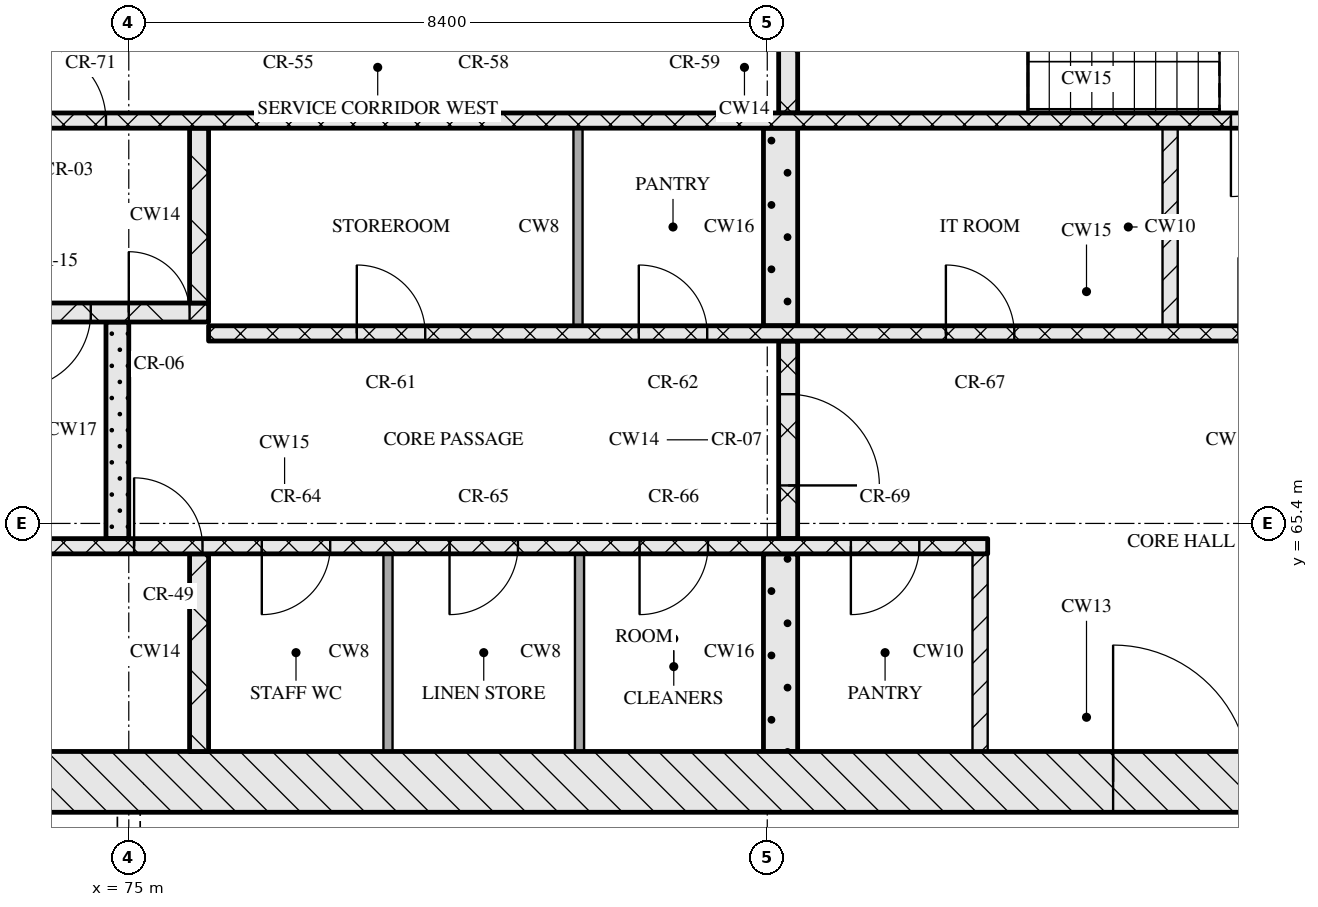
"""IFC4 building model, lengths in metres.
Left out: names, types, materials, properties, quantities, classifications, styles, units other than length and angle.
Written with IfcOpenShell. Run it as: python <this file> out.ifc"""

import sys

from ifc_helpers import new_model, si_unit, direction, frame, frame_2d, origin, place, context, subcontext, project, spatial, rectangle, extrude, element, fill, save


model = new_model("IFC4")
c1 = context("Model", 3, precision=1e-05, world=origin(), true_north=direction((0.0, 1.0)))
c2 = subcontext(c1, "Body", "Model", "MODEL_VIEW")
j1 = project(units=[si_unit("LENGTHUNIT", "METRE"), si_unit("PLANEANGLEUNIT", "RADIAN")], contexts=[c1])
p1 = place(None, origin())
s1 = spatial("IfcSite", under=j1, at=p1, CompositionType="ELEMENT")
p2 = place(p1, origin())
s2 = spatial("IfcBuilding", under=s1, at=p2, CompositionType="ELEMENT")
p3 = place(p2, frame((0.0, 0.0, 190.65)))
s3 = spatial("IfcBuildingStorey", under=s2, at=p3, CompositionType="ELEMENT", Elevation=190.65)
p4 = place(p3, frame((67.0, 62.0, 0.0), z_axis=(0.0, 0.0, 1.0), x_axis=(1.0, 0.0, 0.0)))
e1 = element("IfcWall", 1, at=p4, inside=s3, PredefinedType="SOLIDWALL", context=c2, shape_type="SweptSolid", body=[
    extrude(rectangle(XDim=41.2, YDim=0.8, at=frame_2d((20.6, 0.0))), origin(), (0.0, 0.0, 1.0), 3.3),
])
p5 = place(p4, frame((20.95, 0.0, 0.0)))
e2 = element("IfcOpeningElement", 2, at=p5, cuts=e1, PredefinedType="OPENING", context=c2, shape_type="SweptSolid", body=[
    extrude(rectangle(XDim=1.8, YDim=2.1, at=frame_2d((0.9, 1.05))), frame((0.0, 0.41, 0.0), z_axis=(0.0, -1.0, 0.0), x_axis=(1.0, 0.0, 0.0)), (0.0, 0.0, 1.0), 0.82),
])
p6 = place(p3, frame((75.925, 62.4, 0.0), z_axis=(0.0, 0.0, 1.0), x_axis=(0.0, 1.0, 0.0)))
e3 = element("IfcWall", 3, at=p6, inside=s3, PredefinedType="SOLIDWALL", context=c2, shape_type="SweptSolid", body=[
    extrude(rectangle(XDim=2.6, YDim=0.25, at=frame_2d((1.3, 0.0))), origin(), (0.0, 0.0, 1.0), 3.3),
])
for number, where, z_axis, x_axis in (
    (4, (78.41, 62.4, 0.0), (0.0, 0.0, 1.0), (0.0, 1.0, 0.0)),
    (5, (80.93, 62.4, 0.0), (0.0, 0.0, 1.0), (0.0, 1.0, 0.0)),
):
    element("IfcWall", number, at=place(p3, frame(where, z_axis=z_axis, x_axis=x_axis)), inside=s3, PredefinedType="PARTITIONING", context=c2, shape_type="SweptSolid", body=[
        extrude(rectangle(XDim=2.6, YDim=0.12, at=frame_2d((1.3, 0.0))), origin(), (0.0, 0.0, 1.0), 3.3),
    ])
p7 = place(p3, frame((83.575, 62.4, 0.0), z_axis=(0.0, 0.0, 1.0), x_axis=(0.0, 1.0, 0.0)))
e6 = element("IfcWall", 6, at=p7, inside=s3, PredefinedType="SOLIDWALL", context=c2, shape_type="SweptSolid", body=[
    extrude(rectangle(XDim=2.6, YDim=0.45, at=frame_2d((1.3, 0.0))), origin(), (0.0, 0.0, 1.0), 3.3),
])
p8 = place(p3, frame((86.2, 62.4, 0.0), z_axis=(0.0, 0.0, 1.0), x_axis=(0.0, 1.0, 0.0)))
e7 = element("IfcWall", 7, at=p8, inside=s3, PredefinedType="PARTITIONING", context=c2, shape_type="SweptSolid", body=[
    extrude(rectangle(XDim=2.6, YDim=0.2, at=frame_2d((1.3, 0.0))), origin(), (0.0, 0.0, 1.0), 3.3),
])
p9 = place(p3, frame((67.8, 65.1, 0.0), z_axis=(0.0, 0.0, 1.0), x_axis=(1.0, 0.0, 0.0)))
e8 = element("IfcWall", 8, at=p9, inside=s3, PredefinedType="SOLIDWALL", context=c2, shape_type="SweptSolid", body=[
    extrude(rectangle(XDim=18.5, YDim=0.2, at=frame_2d((9.25, 0.0))), origin(), (0.0, 0.0, 1.0), 3.3),
])
p10 = place(p9, frame((7.27, 0.0, 0.0)))
e9 = element("IfcOpeningElement", 9, at=p10, cuts=e8, PredefinedType="OPENING", context=c2, shape_type="SweptSolid", body=[
    extrude(rectangle(XDim=0.9, YDim=2.1, at=frame_2d((0.45, 1.05))), frame((0.0, 0.11, 0.0), z_axis=(0.0, -1.0, 0.0), x_axis=(1.0, 0.0, 0.0)), (0.0, 0.0, 1.0), 0.22),
])
p11 = place(p9, frame((8.95, 0.0, 0.0)))
e10 = element("IfcOpeningElement", 10, at=p11, cuts=e8, PredefinedType="OPENING", context=c2, shape_type="SweptSolid", body=[
    extrude(rectangle(XDim=0.9, YDim=2.1, at=frame_2d((0.45, 1.05))), frame((0.0, 0.11, 0.0), z_axis=(0.0, -1.0, 0.0), x_axis=(1.0, 0.0, 0.0)), (0.0, 0.0, 1.0), 0.22),
])
p12 = place(p9, frame((11.42, 0.0, 0.0)))
e11 = element("IfcOpeningElement", 11, at=p12, cuts=e8, PredefinedType="OPENING", context=c2, shape_type="SweptSolid", body=[
    extrude(rectangle(XDim=0.9, YDim=2.1, at=frame_2d((0.45, 1.05))), frame((0.0, 0.11, 0.0), z_axis=(0.0, -1.0, 0.0), x_axis=(1.0, 0.0, 0.0)), (0.0, 0.0, 1.0), 0.22),
])
p13 = place(p9, frame((13.92, 0.0, 0.0)))
e12 = element("IfcOpeningElement", 12, at=p13, cuts=e8, PredefinedType="OPENING", context=c2, shape_type="SweptSolid", body=[
    extrude(rectangle(XDim=0.9, YDim=2.1, at=frame_2d((0.45, 1.05))), frame((0.0, 0.11, 0.0), z_axis=(0.0, -1.0, 0.0), x_axis=(1.0, 0.0, 0.0)), (0.0, 0.0, 1.0), 0.22),
])
p14 = place(p9, frame((16.7, 0.0, 0.0)))
e13 = element("IfcOpeningElement", 13, at=p14, cuts=e8, PredefinedType="OPENING", context=c2, shape_type="SweptSolid", body=[
    extrude(rectangle(XDim=0.9, YDim=2.1, at=frame_2d((0.45, 1.05))), frame((0.0, 0.11, 0.0), z_axis=(0.0, -1.0, 0.0), x_axis=(1.0, 0.0, 0.0)), (0.0, 0.0, 1.0), 0.22),
])
p15 = place(p3, frame((74.85, 65.2, 0.0), z_axis=(0.0, 0.0, 1.0), x_axis=(0.0, 1.0, 0.0)))
e14 = element("IfcWall", 14, at=p15, inside=s3, PredefinedType="SOLIDWALL", context=c2, shape_type="SweptSolid", body=[
    extrude(rectangle(XDim=2.85, YDim=0.3, at=frame_2d((1.425, 0.0))), origin(), (0.0, 0.0, 1.0), 3.3),
])
p16 = place(p3, frame((83.675, 65.2, 0.0), z_axis=(0.0, 0.0, 1.0), x_axis=(0.0, 1.0, 0.0)))
e15 = element("IfcWall", 15, at=p16, inside=s3, PredefinedType="SOLIDWALL", context=c2, shape_type="SweptSolid", body=[
    extrude(rectangle(XDim=2.6, YDim=0.25, at=frame_2d((1.3, 0.0))), origin(), (0.0, 0.0, 1.0), 3.3),
])
p17 = place(p16, frame((0.7, 0.0, 0.0)))
e16 = element("IfcOpeningElement", 16, at=p17, cuts=e15, PredefinedType="OPENING", context=c2, shape_type="SweptSolid", body=[
    extrude(rectangle(XDim=1.2, YDim=2.1, at=frame_2d((0.6, 1.05))), frame((0.0, 0.135, 0.0), z_axis=(0.0, -1.0, 0.0), x_axis=(1.0, 0.0, 0.0)), (0.0, 0.0, 1.0), 0.27),
])
p18 = place(p3, frame((76.05, 67.9, 0.0), z_axis=(0.0, 0.0, 1.0), x_axis=(1.0, 0.0, 0.0)))
e17 = element("IfcWall", 17, at=p18, inside=s3, PredefinedType="SOLIDWALL", context=c2, shape_type="SweptSolid", body=[
    extrude(rectangle(XDim=23.1, YDim=0.2, at=frame_2d((11.55, 0.0))), origin(), (0.0, 0.0, 1.0), 3.3),
])
p19 = place(p18, frame((1.95, 0.0, 0.0)))
e18 = element("IfcOpeningElement", 18, at=p19, cuts=e17, PredefinedType="OPENING", context=c2, shape_type="SweptSolid", body=[
    extrude(rectangle(XDim=0.9, YDim=2.1, at=frame_2d((0.45, 1.05))), frame((0.0, 0.11, 0.0), z_axis=(0.0, -1.0, 0.0), x_axis=(1.0, 0.0, 0.0)), (0.0, 0.0, 1.0), 0.22),
])
p20 = place(p18, frame((5.66, 0.0, 0.0)))
e19 = element("IfcOpeningElement", 19, at=p20, cuts=e17, PredefinedType="OPENING", context=c2, shape_type="SweptSolid", body=[
    extrude(rectangle(XDim=0.9, YDim=2.1, at=frame_2d((0.45, 1.05))), frame((0.0, 0.11, 0.0), z_axis=(0.0, -1.0, 0.0), x_axis=(1.0, 0.0, 0.0)), (0.0, 0.0, 1.0), 0.22),
])
p21 = place(p18, frame((9.7, 0.0, 0.0)))
e20 = element("IfcOpeningElement", 20, at=p21, cuts=e17, PredefinedType="OPENING", context=c2, shape_type="SweptSolid", body=[
    extrude(rectangle(XDim=0.9, YDim=2.1, at=frame_2d((0.45, 1.05))), frame((0.0, 0.11, 0.0), z_axis=(0.0, -1.0, 0.0), x_axis=(1.0, 0.0, 0.0)), (0.0, 0.0, 1.0), 0.22),
])
p22 = place(p18, frame((13.55, 0.0, 0.0)))
e21 = element("IfcOpeningElement", 21, at=p22, cuts=e17, PredefinedType="OPENING", context=c2, shape_type="SweptSolid", body=[
    extrude(rectangle(XDim=1.0, YDim=2.1, at=frame_2d((0.5, 1.05))), frame((0.0, 0.11, 0.0), z_axis=(0.0, -1.0, 0.0), x_axis=(1.0, 0.0, 0.0)), (0.0, 0.0, 1.0), 0.22),
])
p23 = place(p18, frame((16.2, 0.0, 0.0)))
e22 = element("IfcOpeningElement", 22, at=p23, cuts=e17, PredefinedType="OPENING", context=c2, shape_type="SweptSolid", body=[
    extrude(rectangle(XDim=1.1, YDim=2.1, at=frame_2d((0.55, 1.05))), frame((0.0, 0.11, 0.0), z_axis=(0.0, -1.0, 0.0), x_axis=(1.0, 0.0, 0.0)), (0.0, 0.0, 1.0), 0.22),
])
p24 = place(p18, frame((18.7, 0.0, 0.0)))
e23 = element("IfcOpeningElement", 23, at=p24, cuts=e17, PredefinedType="OPENING", context=c2, shape_type="SweptSolid", body=[
    extrude(rectangle(XDim=1.1, YDim=2.1, at=frame_2d((0.55, 1.05))), frame((0.0, 0.11, 0.0), z_axis=(0.0, -1.0, 0.0), x_axis=(1.0, 0.0, 0.0)), (0.0, 0.0, 1.0), 0.22),
])
p25 = place(p18, frame((21.2, 0.0, 0.0)))
e24 = element("IfcOpeningElement", 24, at=p25, cuts=e17, PredefinedType="OPENING", context=c2, shape_type="SweptSolid", body=[
    extrude(rectangle(XDim=1.1, YDim=2.1, at=frame_2d((0.55, 1.05))), frame((0.0, 0.11, 0.0), z_axis=(0.0, -1.0, 0.0), x_axis=(1.0, 0.0, 0.0)), (0.0, 0.0, 1.0), 0.22),
])
p26 = place(p3, frame((80.91, 68.0, 0.0), z_axis=(0.0, 0.0, 1.0), x_axis=(0.0, 1.0, 0.0)))
e25 = element("IfcWall", 25, at=p26, inside=s3, PredefinedType="PARTITIONING", context=c2, shape_type="SweptSolid", body=[
    extrude(rectangle(XDim=2.6, YDim=0.12, at=frame_2d((1.3, 0.0))), origin(), (0.0, 0.0, 1.0), 3.3),
])
p27 = place(p3, frame((83.575, 68.0, 0.0), z_axis=(0.0, 0.0, 1.0), x_axis=(0.0, 1.0, 0.0)))
e26 = element("IfcWall", 26, at=p27, inside=s3, PredefinedType="SOLIDWALL", context=c2, shape_type="SweptSolid", body=[
    extrude(rectangle(XDim=2.6, YDim=0.45, at=frame_2d((1.3, 0.0))), origin(), (0.0, 0.0, 1.0), 3.3),
])
p28 = place(p3, frame((88.7, 68.0, 0.0), z_axis=(0.0, 0.0, 1.0), x_axis=(0.0, 1.0, 0.0)))
e27 = element("IfcWall", 27, at=p28, inside=s3, PredefinedType="PARTITIONING", context=c2, shape_type="SweptSolid", body=[
    extrude(rectangle(XDim=2.6, YDim=0.2, at=frame_2d((1.3, 0.0))), origin(), (0.0, 0.0, 1.0), 3.3),
])
p29 = place(p3, frame((67.8, 68.175, 0.0), z_axis=(0.0, 0.0, 1.0), x_axis=(1.0, 0.0, 0.0)))
e28 = element("IfcWall", 28, at=p29, inside=s3, PredefinedType="SOLIDWALL", context=c2, shape_type="SweptSolid", body=[
    extrude(rectangle(XDim=8.25, YDim=0.25, at=frame_2d((4.125, 0.0))), origin(), (0.0, 0.0, 1.0), 3.3),
])
p30 = place(p29, frame((5.7, 0.0, 0.0)))
e29 = element("IfcOpeningElement", 29, at=p30, cuts=e28, PredefinedType="OPENING", context=c2, shape_type="SweptSolid", body=[
    extrude(rectangle(XDim=1.0, YDim=2.1, at=frame_2d((0.5, 1.05))), frame((0.0, 0.135, 0.0), z_axis=(0.0, -1.0, 0.0), x_axis=(1.0, 0.0, 0.0)), (0.0, 0.0, 1.0), 0.27),
])
p31 = place(p29, frame((7.2, 0.0, 0.0)))
e30 = element("IfcOpeningElement", 30, at=p31, cuts=e28, PredefinedType="OPENING", context=c2, shape_type="SweptSolid", body=[
    extrude(rectangle(XDim=0.8, YDim=2.1, at=frame_2d((0.4, 1.05))), frame((0.0, 0.135, 0.0), z_axis=(0.0, -1.0, 0.0), x_axis=(1.0, 0.0, 0.0)), (0.0, 0.0, 1.0), 0.27),
])
p32 = place(p3, frame((75.925, 68.3, 0.0), z_axis=(0.0, 0.0, 1.0), x_axis=(0.0, 1.0, 0.0)))
e31 = element("IfcWall", 31, at=p32, inside=s3, PredefinedType="SOLIDWALL", context=c2, shape_type="SweptSolid", body=[
    extrude(rectangle(XDim=2.3, YDim=0.25, at=frame_2d((1.15, 0.0))), origin(), (0.0, 0.0, 1.0), 3.3),
])
p33 = place(p3, frame((67.8, 70.7, 0.0), z_axis=(0.0, 0.0, 1.0), x_axis=(1.0, 0.0, 0.0)))
e32 = element("IfcWall", 32, at=p33, inside=s3, PredefinedType="SOLIDWALL", context=c2, shape_type="SweptSolid", body=[
    extrude(rectangle(XDim=39.6, YDim=0.2, at=frame_2d((19.8, 0.0))), origin(), (0.0, 0.0, 1.0), 3.3),
])
p34 = place(p33, frame((0.65, 0.0, 0.0)))
e33 = element("IfcOpeningElement", 33, at=p34, cuts=e32, PredefinedType="OPENING", context=c2, shape_type="SweptSolid", body=[
    extrude(rectangle(XDim=1.1, YDim=2.1, at=frame_2d((0.55, 1.05))), frame((0.0, 0.11, 0.0), z_axis=(0.0, -1.0, 0.0), x_axis=(1.0, 0.0, 0.0)), (0.0, 0.0, 1.0), 0.22),
])
p35 = place(p33, frame((3.25, 0.0, 0.0)))
e34 = element("IfcOpeningElement", 34, at=p35, cuts=e32, PredefinedType="OPENING", context=c2, shape_type="SweptSolid", body=[
    extrude(rectangle(XDim=1.1, YDim=2.1, at=frame_2d((0.55, 1.05))), frame((0.0, 0.11, 0.0), z_axis=(0.0, -1.0, 0.0), x_axis=(1.0, 0.0, 0.0)), (0.0, 0.0, 1.0), 0.22),
])
p36 = place(p33, frame((5.9, 0.0, 0.0)))
e35 = element("IfcOpeningElement", 35, at=p36, cuts=e32, PredefinedType="OPENING", context=c2, shape_type="SweptSolid", body=[
    extrude(rectangle(XDim=1.0, YDim=2.1, at=frame_2d((0.5, 1.05))), frame((0.0, 0.11, 0.0), z_axis=(0.0, -1.0, 0.0), x_axis=(1.0, 0.0, 0.0)), (0.0, 0.0, 1.0), 0.22),
])
p37 = place(p33, frame((21.7, 0.0, 0.0)))
e36 = element("IfcOpeningElement", 36, at=p37, cuts=e32, PredefinedType="OPENING", context=c2, shape_type="SweptSolid", body=[
    extrude(rectangle(XDim=1.0, YDim=2.1, at=frame_2d((0.5, 1.05))), frame((0.0, 0.11, 0.0), z_axis=(0.0, -1.0, 0.0), x_axis=(1.0, 0.0, 0.0)), (0.0, 0.0, 1.0), 0.22),
])
p38 = place(p33, frame((32.7, 0.0, 0.0)))
e37 = element("IfcOpeningElement", 37, at=p38, cuts=e32, PredefinedType="OPENING", context=c2, shape_type="SweptSolid", body=[
    extrude(rectangle(XDim=1.0, YDim=2.1, at=frame_2d((0.5, 1.05))), frame((0.0, 0.11, 0.0), z_axis=(0.0, -1.0, 0.0), x_axis=(1.0, 0.0, 0.0)), (0.0, 0.0, 1.0), 0.22),
])
p39 = place(p33, frame((35.25, 0.0, 0.0)))
e38 = element("IfcOpeningElement", 38, at=p39, cuts=e32, PredefinedType="OPENING", context=c2, shape_type="SweptSolid", body=[
    extrude(rectangle(XDim=1.1, YDim=2.1, at=frame_2d((0.55, 1.05))), frame((0.0, 0.11, 0.0), z_axis=(0.0, -1.0, 0.0), x_axis=(1.0, 0.0, 0.0)), (0.0, 0.0, 1.0), 0.22),
])
p40 = place(p33, frame((37.85, 0.0, 0.0)))
e39 = element("IfcOpeningElement", 39, at=p40, cuts=e32, PredefinedType="OPENING", context=c2, shape_type="SweptSolid", body=[
    extrude(rectangle(XDim=1.1, YDim=2.1, at=frame_2d((0.55, 1.05))), frame((0.0, 0.11, 0.0), z_axis=(0.0, -1.0, 0.0), x_axis=(1.0, 0.0, 0.0)), (0.0, 0.0, 1.0), 0.22),
])
p41 = place(p3, frame((83.675, 70.8, 0.0), z_axis=(0.0, 0.0, 1.0), x_axis=(0.0, 1.0, 0.0)))
e40 = element("IfcWall", 40, at=p41, inside=s3, PredefinedType="SOLIDWALL", context=c2, shape_type="SweptSolid", body=[
    extrude(rectangle(XDim=1.2, YDim=0.25, at=frame_2d((0.6, 0.0))), origin(), (0.0, 0.0, 1.0), 3.3),
])
p42 = place(p5, origin())
e41 = element("IfcDoor", 41, at=p42, inside=s3, OperationType="DOUBLE_DOOR_SINGLE_SWING", PredefinedType="DOOR", context=c2, shape_type="SweptSolid", body=[
    extrude(rectangle(XDim=1.8, YDim=2.1, at=frame_2d((0.9, 1.05))), frame((0.0, 0.025, 0.0), z_axis=(0.0, -1.0, 0.0), x_axis=(1.0, 0.0, 0.0)), (0.0, 0.0, 1.0), 0.05),
])
fill(e2, e41)
p43 = place(p10, origin())
e42 = element("IfcDoor", 42, at=p43, inside=s3, OperationType="SINGLE_SWING_LEFT", PredefinedType="DOOR", context=c2, shape_type="SweptSolid", body=[
    extrude(rectangle(XDim=0.9, YDim=2.1, at=frame_2d((0.45, 1.05))), frame((0.0, 0.025, 0.0), z_axis=(0.0, -1.0, 0.0), x_axis=(1.0, 0.0, 0.0)), (0.0, 0.0, 1.0), 0.05),
])
fill(e9, e42)
p44 = place(p11, origin())
e43 = element("IfcDoor", 43, at=p44, inside=s3, OperationType="SINGLE_SWING_RIGHT", PredefinedType="DOOR", context=c2, shape_type="SweptSolid", body=[
    extrude(rectangle(XDim=0.9, YDim=2.1, at=frame_2d((0.45, 1.05))), frame((0.0, 0.025, 0.0), z_axis=(0.0, -1.0, 0.0), x_axis=(1.0, 0.0, 0.0)), (0.0, 0.0, 1.0), 0.05),
])
fill(e10, e43)
p45 = place(p12, origin())
e44 = element("IfcDoor", 44, at=p45, inside=s3, OperationType="SINGLE_SWING_RIGHT", PredefinedType="DOOR", context=c2, shape_type="SweptSolid", body=[
    extrude(rectangle(XDim=0.9, YDim=2.1, at=frame_2d((0.45, 1.05))), frame((0.0, 0.025, 0.0), z_axis=(0.0, -1.0, 0.0), x_axis=(1.0, 0.0, 0.0)), (0.0, 0.0, 1.0), 0.05),
])
fill(e11, e44)
p46 = place(p13, origin())
e45 = element("IfcDoor", 45, at=p46, inside=s3, OperationType="SINGLE_SWING_RIGHT", PredefinedType="DOOR", context=c2, shape_type="SweptSolid", body=[
    extrude(rectangle(XDim=0.9, YDim=2.1, at=frame_2d((0.45, 1.05))), frame((0.0, 0.025, 0.0), z_axis=(0.0, -1.0, 0.0), x_axis=(1.0, 0.0, 0.0)), (0.0, 0.0, 1.0), 0.05),
])
fill(e12, e45)
p47 = place(p14, origin())
e46 = element("IfcDoor", 46, at=p47, inside=s3, OperationType="SINGLE_SWING_RIGHT", PredefinedType="DOOR", context=c2, shape_type="SweptSolid", body=[
    extrude(rectangle(XDim=0.9, YDim=2.1, at=frame_2d((0.45, 1.05))), frame((0.0, 0.025, 0.0), z_axis=(0.0, -1.0, 0.0), x_axis=(1.0, 0.0, 0.0)), (0.0, 0.0, 1.0), 0.05),
])
fill(e13, e46)
p48 = place(p17, origin())
e47 = element("IfcDoor", 47, at=p48, inside=s3, OperationType="SINGLE_SWING_RIGHT", PredefinedType="DOOR", context=c2, shape_type="SweptSolid", body=[
    extrude(rectangle(XDim=1.2, YDim=2.1, at=frame_2d((0.6, 1.05))), frame((0.0, 0.025, 0.0), z_axis=(0.0, -1.0, 0.0), x_axis=(1.0, 0.0, 0.0)), (0.0, 0.0, 1.0), 0.05),
])
fill(e16, e47)
p49 = place(p19, origin())
e48 = element("IfcDoor", 48, at=p49, inside=s3, OperationType="SINGLE_SWING_LEFT", PredefinedType="DOOR", context=c2, shape_type="SweptSolid", body=[
    extrude(rectangle(XDim=0.9, YDim=2.1, at=frame_2d((0.45, 1.05))), frame((0.0, 0.025, 0.0), z_axis=(0.0, -1.0, 0.0), x_axis=(1.0, 0.0, 0.0)), (0.0, 0.0, 1.0), 0.05),
])
fill(e18, e48)
p50 = place(p20, origin())
e49 = element("IfcDoor", 49, at=p50, inside=s3, OperationType="SINGLE_SWING_LEFT", PredefinedType="DOOR", context=c2, shape_type="SweptSolid", body=[
    extrude(rectangle(XDim=0.9, YDim=2.1, at=frame_2d((0.45, 1.05))), frame((0.0, 0.025, 0.0), z_axis=(0.0, -1.0, 0.0), x_axis=(1.0, 0.0, 0.0)), (0.0, 0.0, 1.0), 0.05),
])
fill(e19, e49)
p51 = place(p21, origin())
e50 = element("IfcDoor", 50, at=p51, inside=s3, OperationType="SINGLE_SWING_LEFT", PredefinedType="DOOR", context=c2, shape_type="SweptSolid", body=[
    extrude(rectangle(XDim=0.9, YDim=2.1, at=frame_2d((0.45, 1.05))), frame((0.0, 0.025, 0.0), z_axis=(0.0, -1.0, 0.0), x_axis=(1.0, 0.0, 0.0)), (0.0, 0.0, 1.0), 0.05),
])
fill(e20, e50)
p52 = place(p30, origin())
e51 = element("IfcDoor", 51, at=p52, inside=s3, OperationType="SINGLE_SWING_RIGHT", PredefinedType="DOOR", context=c2, shape_type="SweptSolid", body=[
    extrude(rectangle(XDim=1.0, YDim=2.1, at=frame_2d((0.5, 1.05))), frame((0.0, 0.025, 0.0), z_axis=(0.0, -1.0, 0.0), x_axis=(1.0, 0.0, 0.0)), (0.0, 0.0, 1.0), 0.05),
])
fill(e29, e51)
p53 = place(p31, origin())
e52 = element("IfcDoor", 52, at=p53, inside=s3, OperationType="SINGLE_SWING_LEFT", PredefinedType="DOOR", context=c2, shape_type="SweptSolid", body=[
    extrude(rectangle(XDim=0.8, YDim=2.1, at=frame_2d((0.4, 1.05))), frame((0.0, 0.025, 0.0), z_axis=(0.0, -1.0, 0.0), x_axis=(1.0, 0.0, 0.0)), (0.0, 0.0, 1.0), 0.05),
])
fill(e30, e52)
p54 = place(p36, origin())
e53 = element("IfcDoor", 53, at=p54, inside=s3, OperationType="SINGLE_SWING_LEFT", PredefinedType="DOOR", context=c2, shape_type="SweptSolid", body=[
    extrude(rectangle(XDim=1.0, YDim=2.1, at=frame_2d((0.5, 1.05))), frame((0.0, 0.025, 0.0), z_axis=(0.0, -1.0, 0.0), x_axis=(1.0, 0.0, 0.0)), (0.0, 0.0, 1.0), 0.05),
])
fill(e35, e53)
p55 = place(p37, origin())
e54 = element("IfcDoor", 54, at=p55, inside=s3, OperationType="SINGLE_SWING_RIGHT", PredefinedType="DOOR", context=c2, shape_type="SweptSolid", body=[
    extrude(rectangle(XDim=1.0, YDim=2.1, at=frame_2d((0.5, 1.05))), frame((0.0, 0.025, 0.0), z_axis=(0.0, -1.0, 0.0), x_axis=(1.0, 0.0, 0.0)), (0.0, 0.0, 1.0), 0.05),
])
fill(e36, e54)
save(model, sys.argv[1])
